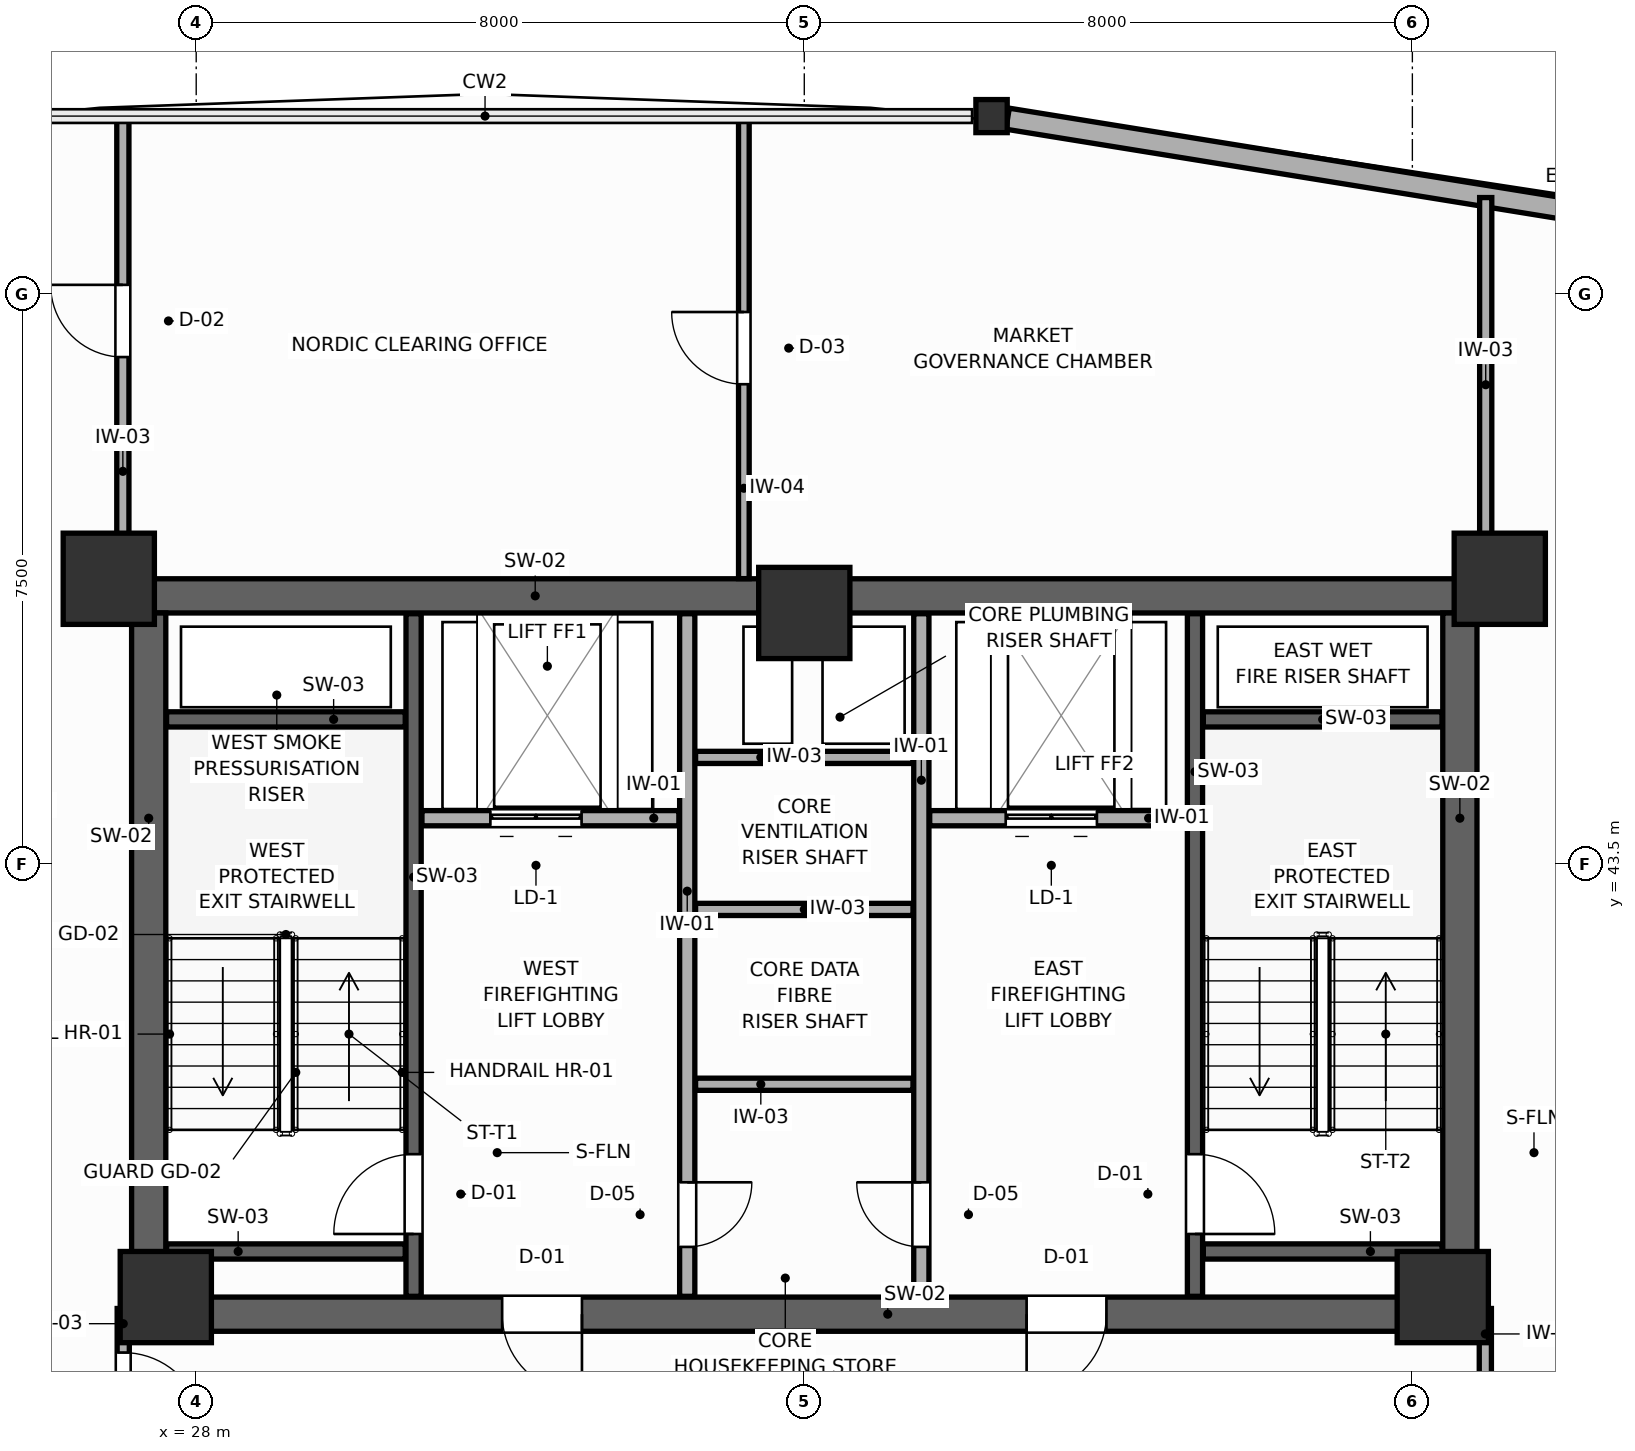
"""IFC4 building model, lengths in metres.
Left out: names, types, materials, properties, quantities, classifications, styles, units other than length and angle.
Written with IfcOpenShell. Run it as: python <this file> out.ifc"""

import sys

from ifc_helpers import new_model, si_unit, direction, frame, frame_2d, origin, origin_2d, place, context, subcontext, project, spatial, rectangle, i_section, extrude, source, transform, mapped, element, fill, save


model = new_model("IFC4")
c1 = context("Model", 3, precision=1e-05, world=origin(), true_north=direction((0.0, 1.0)))
c2 = subcontext(c1, "Body", "Model", "MODEL_VIEW")
j1 = project(units=[si_unit("LENGTHUNIT", "METRE"), si_unit("PLANEANGLEUNIT", "RADIAN")], contexts=[c1])
p1 = place(None, origin())
s1 = spatial("IfcSite", under=j1, at=p1, CompositionType="ELEMENT")
p2 = place(p1, origin())
s2 = spatial("IfcBuilding", under=s1, at=p2, CompositionType="ELEMENT")
p3 = place(p2, frame((0.0, 0.0, 143.4)))
s3 = spatial("IfcBuildingStorey", under=s2, at=p3, CompositionType="ELEMENT", Elevation=143.4)
p4 = place(p3, frame((27.15, 47.025, 0.0), z_axis=(0.0, 0.0, 1.0), x_axis=(1.0, 0.0, 0.0)))
e1 = element("IfcWall", 1, at=p4, inside=s3, PredefinedType="SHEAR", context=c2, shape_type="SweptSolid", body=[
    extrude(rectangle(XDim=17.7, YDim=0.45, at=frame_2d((8.85, 0.0))), origin(), (0.0, 0.0, 1.0), 3.6),
])
p5 = place(p3, frame((27.15, 37.575, 0.0), z_axis=(0.0, 0.0, 1.0), x_axis=(1.0, 0.0, 0.0)))
e2 = element("IfcWall", 2, at=p5, inside=s3, PredefinedType="SHEAR", context=c2, shape_type="SweptSolid", body=[
    extrude(rectangle(XDim=17.7, YDim=0.45, at=frame_2d((8.85, 0.0))), origin(), (0.0, 0.0, 1.0), 3.6),
])
p6 = place(p5, frame((4.875, 0.0, 0.0)))
e3 = element("IfcOpeningElement", 3, at=p6, cuts=e2, PredefinedType="OPENING", context=c2, shape_type="SweptSolid", body=[
    extrude(rectangle(XDim=1.05, YDim=2.1, at=frame_2d((0.525, 1.05))), frame((0.0, 0.235, 0.0), z_axis=(0.0, -1.0, 0.0), x_axis=(1.0, 0.0, 0.0)), (0.0, 0.0, 1.0), 0.47),
])
p7 = place(p5, frame((11.775, 0.0, 0.0)))
e4 = element("IfcOpeningElement", 4, at=p7, cuts=e2, PredefinedType="OPENING", context=c2, shape_type="SweptSolid", body=[
    extrude(rectangle(XDim=1.05, YDim=2.1, at=frame_2d((0.525, 1.05))), frame((0.0, 0.235, 0.0), z_axis=(0.0, -1.0, 0.0), x_axis=(1.0, 0.0, 0.0)), (0.0, 0.0, 1.0), 0.47),
])
for number, where, z_axis, x_axis in (
    (5, (27.375, 37.8, 0.0), (0.0, 0.0, 1.0), (0.0, 1.0, 0.0)),
    (6, (44.625, 37.8, 0.0), (0.0, 0.0, 1.0), (0.0, 1.0, 0.0)),
):
    element("IfcWall", number, at=place(p3, frame(where, z_axis=z_axis, x_axis=x_axis)), inside=s3, PredefinedType="SHEAR", context=c2, shape_type="SweptSolid", body=[
        extrude(rectangle(XDim=9.0, YDim=0.45, at=frame_2d((4.5, 0.0))), origin(), (0.0, 0.0, 1.0), 3.6),
    ])
m1 = source(origin(), c2, "Body", "SweptSolid", [
    extrude(rectangle(XDim=1.2, YDim=1.2, at=origin_2d()), origin(), (0.0, 0.0, 1.0), 3.6),
])
for number, where, z_axis, x_axis in (
    (7, (26.85, 47.25, 0.0), (0.0, 0.0, 1.0), (1.0, 0.0, 0.0)),
    (8, (45.15, 47.25, 0.0), (0.0, 0.0, 1.0), (1.0, 0.0, 0.0)),
    (9, (27.6, 37.8, 0.0), (0.0, 0.0, 1.0), (1.0, 0.0, 0.0)),
    (10, (44.4, 37.8, 0.0), (0.0, 0.0, 1.0), (1.0, 0.0, 0.0)),
    (11, (36.0, 46.8, 0.0), (0.0, 0.0, 1.0), (1.0, 0.0, 0.0)),
):
    element("IfcColumn", number, at=place(p3, frame(where, z_axis=z_axis, x_axis=x_axis)), inside=s3, PredefinedType="COLUMN", context=c2, shape_type="MappedRepresentation", body=[
        mapped(m1, transform((0.0, 0.0, 0.0), scale=1.0)),
    ])
m2 = source(origin(), c2, "Body", "SweptSolid", [
    extrude(i_section(OverallWidth=0.412, OverallDepth=0.435, WebThickness=0.033, FlangeThickness=0.053, FilletRadius=0.015, at=origin_2d()), origin(), (0.0, 0.0, 1.0), 3.6),
])
p8 = place(p3, frame((38.464, 53.337, 0.0), z_axis=(0.0, 0.0, 1.0), x_axis=(1.0, 0.0, 0.0)))
e12 = element("IfcColumn", 12, at=p8, inside=s3, PredefinedType="COLUMN", context=c2, shape_type="MappedRepresentation", body=[
    mapped(m2, transform((0.0, 0.0, 0.0), scale=1.0)),
])
p9 = place(p3, frame((53.646, 50.881, 0.0), z_axis=(0.0, 0.0, 1.0), x_axis=(-0.987165905884, 0.159698072185, 0.0)))
e13 = element("IfcWall", 13, at=p9, inside=s3, PredefinedType="SOLIDWALL", context=c2, shape_type="SweptSolid", body=[
    extrude(rectangle(XDim=15.165, YDim=0.28, at=frame_2d((7.583, 0.0))), origin(), (0.0, 0.0, 1.0), 1.87),
])
p10 = place(p3, frame((30.86, 37.81, 0.0), z_axis=(0.0, 0.0, 1.0), x_axis=(0.0, 1.0, 0.0)))
e14 = element("IfcWall", 14, at=p10, inside=s3, PredefinedType="SHEAR", context=c2, shape_type="SweptSolid", body=[
    extrude(rectangle(XDim=8.98, YDim=0.2, at=frame_2d((4.49, 0.0))), origin(), (0.0, 0.0, 1.0), 3.6),
])
p11 = place(p10, frame((0.82, 0.0, 0.0)))
e15 = element("IfcOpeningElement", 15, at=p11, cuts=e14, PredefinedType="OPENING", context=c2, shape_type="SweptSolid", body=[
    extrude(rectangle(XDim=1.05, YDim=2.1, at=frame_2d((0.525, 1.05))), frame((0.0, 0.11, 0.0), z_axis=(0.0, -1.0, 0.0), x_axis=(1.0, 0.0, 0.0)), (0.0, 0.0, 1.0), 0.22),
])
for number, where, z_axis, x_axis in (
    (16, (27.61, 45.4, 0.0), (0.0, 0.0, 1.0), (1.0, 0.0, 0.0)),
    (17, (27.61, 38.4, 0.0), (0.0, 0.0, 1.0), (1.0, 0.0, 0.0)),
):
    element("IfcWall", number, at=place(p3, frame(where, z_axis=z_axis, x_axis=x_axis)), inside=s3, PredefinedType="SHEAR", context=c2, shape_type="SweptSolid", body=[
        extrude(rectangle(XDim=3.14, YDim=0.2, at=frame_2d((1.57, 0.0))), origin(), (0.0, 0.0, 1.0), 3.6),
    ])
p12 = place(p3, frame((41.14, 37.81, 0.0), z_axis=(0.0, 0.0, 1.0), x_axis=(0.0, 1.0, 0.0)))
e18 = element("IfcWall", 18, at=p12, inside=s3, PredefinedType="SHEAR", context=c2, shape_type="SweptSolid", body=[
    extrude(rectangle(XDim=8.98, YDim=0.2, at=frame_2d((4.49, 0.0))), origin(), (0.0, 0.0, 1.0), 3.6),
])
p13 = place(p12, frame((0.82, 0.0, 0.0)))
e19 = element("IfcOpeningElement", 19, at=p13, cuts=e18, PredefinedType="OPENING", context=c2, shape_type="SweptSolid", body=[
    extrude(rectangle(XDim=1.05, YDim=2.1, at=frame_2d((0.525, 1.05))), frame((0.0, 0.11, 0.0), z_axis=(0.0, -1.0, 0.0), x_axis=(1.0, 0.0, 0.0)), (0.0, 0.0, 1.0), 0.22),
])
for number, where, z_axis, x_axis in (
    (20, (41.25, 45.4, 0.0), (0.0, 0.0, 1.0), (1.0, 0.0, 0.0)),
    (21, (41.25, 38.4, 0.0), (0.0, 0.0, 1.0), (1.0, 0.0, 0.0)),
):
    element("IfcWall", number, at=place(p3, frame(where, z_axis=z_axis, x_axis=x_axis)), inside=s3, PredefinedType="SHEAR", context=c2, shape_type="SweptSolid", body=[
        extrude(rectangle(XDim=3.14, YDim=0.2, at=frame_2d((1.57, 0.0))), origin(), (0.0, 0.0, 1.0), 3.6),
    ])
p14 = place(p3, frame((30.97, 44.1, 0.0), z_axis=(0.0, 0.0, 1.0), x_axis=(1.0, 0.0, 0.0)))
e22 = element("IfcWall", 22, at=p14, inside=s3, PredefinedType="PARTITIONING", context=c2, shape_type="SweptSolid", body=[
    extrude(rectangle(XDim=3.38, YDim=0.2, at=frame_2d((1.69, 0.0))), origin(), (0.0, 0.0, 1.0), 3.4),
])
p15 = place(p14, frame((0.9, 0.0, 0.0)))
e23 = element("IfcOpeningElement", 23, at=p15, cuts=e22, PredefinedType="OPENING", context=c2, shape_type="SweptSolid", body=[
    extrude(rectangle(XDim=1.2, YDim=2.1, at=frame_2d((0.6, 1.05))), frame((0.0, 0.11, 0.0), z_axis=(0.0, -1.0, 0.0), x_axis=(1.0, 0.0, 0.0)), (0.0, 0.0, 1.0), 0.22),
])
p16 = place(p3, frame((37.65, 44.1, 0.0), z_axis=(0.0, 0.0, 1.0), x_axis=(1.0, 0.0, 0.0)))
e24 = element("IfcWall", 24, at=p16, inside=s3, PredefinedType="PARTITIONING", context=c2, shape_type="SweptSolid", body=[
    extrude(rectangle(XDim=3.38, YDim=0.2, at=frame_2d((1.69, 0.0))), origin(), (0.0, 0.0, 1.0), 3.4),
])
p17 = place(p16, frame((1.0, 0.0, 0.0)))
e25 = element("IfcOpeningElement", 25, at=p17, cuts=e24, PredefinedType="OPENING", context=c2, shape_type="SweptSolid", body=[
    extrude(rectangle(XDim=1.2, YDim=2.1, at=frame_2d((0.6, 1.05))), frame((0.0, 0.11, 0.0), z_axis=(0.0, -1.0, 0.0), x_axis=(1.0, 0.0, 0.0)), (0.0, 0.0, 1.0), 0.22),
])
p18 = place(p3, frame((34.46, 37.81, 0.0), z_axis=(0.0, 0.0, 1.0), x_axis=(0.0, 1.0, 0.0)))
e26 = element("IfcWall", 26, at=p18, inside=s3, PredefinedType="PARTITIONING", context=c2, shape_type="SweptSolid", body=[
    extrude(rectangle(XDim=8.98, YDim=0.2, at=frame_2d((4.49, 0.0))), origin(), (0.0, 0.0, 1.0), 3.4),
])
p19 = place(p18, frame((0.65, 0.0, 0.0)))
e27 = element("IfcOpeningElement", 27, at=p19, cuts=e26, PredefinedType="OPENING", context=c2, shape_type="SweptSolid", body=[
    extrude(rectangle(XDim=0.85, YDim=2.05, at=frame_2d((0.425, 1.025))), frame((0.0, 0.11, 0.0), z_axis=(0.0, -1.0, 0.0), x_axis=(1.0, 0.0, 0.0)), (0.0, 0.0, 1.0), 0.22),
])
p20 = place(p3, frame((37.54, 37.81, 0.0), z_axis=(0.0, 0.0, 1.0), x_axis=(0.0, 1.0, 0.0)))
e28 = element("IfcWall", 28, at=p20, inside=s3, PredefinedType="PARTITIONING", context=c2, shape_type="SweptSolid", body=[
    extrude(rectangle(XDim=8.98, YDim=0.2, at=frame_2d((4.49, 0.0))), origin(), (0.0, 0.0, 1.0), 3.4),
])
p21 = place(p20, frame((0.65, 0.0, 0.0)))
e29 = element("IfcOpeningElement", 29, at=p21, cuts=e28, PredefinedType="OPENING", context=c2, shape_type="SweptSolid", body=[
    extrude(rectangle(XDim=0.85, YDim=2.05, at=frame_2d((0.425, 1.025))), frame((0.0, 0.11, 0.0), z_axis=(0.0, -1.0, 0.0), x_axis=(1.0, 0.0, 0.0)), (0.0, 0.0, 1.0), 0.22),
])
for number, where, z_axis, x_axis in (
    (30, (34.57, 40.6, 0.0), (0.0, 0.0, 1.0), (1.0, 0.0, 0.0)),
    (31, (34.57, 42.9, 0.0), (0.0, 0.0, 1.0), (1.0, 0.0, 0.0)),
    (32, (34.57, 44.9, 0.0), (0.0, 0.0, 1.0), (1.0, 0.0, 0.0)),
):
    element("IfcWall", number, at=place(p3, frame(where, z_axis=z_axis, x_axis=x_axis)), inside=s3, PredefinedType="PARTITIONING", context=c2, shape_type="SweptSolid", body=[
        extrude(rectangle(XDim=2.86, YDim=0.16, at=frame_2d((1.43, 0.0))), origin(), (0.0, 0.0, 1.0), 3.4),
    ])
p22 = place(p3, frame((27.04, 35.54, 0.0), z_axis=(0.0, 0.0, 1.0), x_axis=(0.0, 1.0, 0.0)))
e33 = element("IfcWall", 33, at=p22, inside=s3, PredefinedType="PARTITIONING", context=c2, shape_type="SweptSolid", body=[
    extrude(rectangle(XDim=2.11, YDim=0.16, at=frame_2d((1.055, 0.0))), origin(), (0.0, 0.0, 1.0), 3.4),
])
p23 = place(p22, frame((0.48, 0.0, 0.0)))
e34 = element("IfcOpeningElement", 34, at=p23, cuts=e33, PredefinedType="OPENING", context=c2, shape_type="SweptSolid", body=[
    extrude(rectangle(XDim=1.05, YDim=2.1, at=frame_2d((0.525, 1.05))), frame((0.0, 0.09, 0.0), z_axis=(0.0, -1.0, 0.0), x_axis=(1.0, 0.0, 0.0)), (0.0, 0.0, 1.0), 0.18),
])
p24 = place(p3, frame((44.96, 35.0, 0.0), z_axis=(0.0, 0.0, 1.0), x_axis=(0.0, 1.0, 0.0)))
e35 = element("IfcWall", 35, at=p24, inside=s3, PredefinedType="PARTITIONING", context=c2, shape_type="SweptSolid", body=[
    extrude(rectangle(XDim=2.65, YDim=0.16, at=frame_2d((1.325, 0.0))), origin(), (0.0, 0.0, 1.0), 3.4),
])
p25 = place(p24, frame((0.75, 0.0, 0.0)))
e36 = element("IfcOpeningElement", 36, at=p25, cuts=e35, PredefinedType="OPENING", context=c2, shape_type="SweptSolid", body=[
    extrude(rectangle(XDim=1.05, YDim=2.1, at=frame_2d((0.525, 1.05))), frame((0.0, 0.09, 0.0), z_axis=(0.0, -1.0, 0.0), x_axis=(1.0, 0.0, 0.0)), (0.0, 0.0, 1.0), 0.18),
])
p26 = place(p3, frame((27.035, 47.34, 0.0), z_axis=(0.0, 0.0, 1.0), x_axis=(0.0, 1.0, 0.0)))
e37 = element("IfcWall", 37, at=p26, inside=s3, PredefinedType="PARTITIONING", context=c2, shape_type="SweptSolid", body=[
    extrude(rectangle(XDim=5.977, YDim=0.16, at=frame_2d((2.988, 0.0))), origin(), (0.0, 0.0, 1.0), 2.16),
])
p27 = place(p26, frame((2.827, 0.0, 0.0)))
e38 = element("IfcOpeningElement", 38, at=p27, cuts=e37, PredefinedType="OPENING", context=c2, shape_type="SweptSolid", body=[
    extrude(rectangle(XDim=0.95, YDim=2.05, at=frame_2d((0.475, 1.025))), frame((0.0, 0.09, 0.0), z_axis=(0.0, -1.0, 0.0), x_axis=(1.0, 0.0, 0.0)), (0.0, 0.0, 1.0), 0.18),
])
p28 = place(p3, frame((44.965, 47.34, 0.0), z_axis=(0.0, 0.0, 1.0), x_axis=(0.0, 1.0, 0.0)))
e39 = element("IfcWall", 39, at=p28, inside=s3, PredefinedType="PARTITIONING", context=c2, shape_type="SweptSolid", body=[
    extrude(rectangle(XDim=4.925, YDim=0.16, at=frame_2d((2.463, 0.0))), origin(), (0.0, 0.0, 1.0), 3.4),
])
p29 = place(p3, frame((35.205, 47.252, 0.0), z_axis=(0.0, 0.0, 1.0), x_axis=(0.0, 1.0, 0.0)))
e40 = element("IfcWall", 40, at=p29, inside=s3, PredefinedType="PARTITIONING", context=c2, shape_type="SweptSolid", body=[
    extrude(rectangle(XDim=6.065, YDim=0.14, at=frame_2d((3.032, 0.0))), origin(), (0.0, 0.0, 1.0), 3.4),
])
p30 = place(p29, frame((2.558, 0.0, 0.0)))
e41 = element("IfcOpeningElement", 41, at=p30, cuts=e40, PredefinedType="OPENING", context=c2, shape_type="SweptSolid", body=[
    extrude(rectangle(XDim=0.95, YDim=2.05, at=frame_2d((0.475, 1.025))), frame((0.0, 0.08, 0.0), z_axis=(0.0, -1.0, 0.0), x_axis=(1.0, 0.0, 0.0)), (0.0, 0.0, 1.0), 0.16),
])
p31 = place(p11, origin())
e42 = element("IfcDoor", 42, at=p31, inside=s3, OperationType="SINGLE_SWING_LEFT", PredefinedType="DOOR", context=c2, shape_type="SweptSolid", body=[
    extrude(rectangle(XDim=1.05, YDim=2.1, at=frame_2d((0.525, 1.05))), frame((0.0, 0.025, 0.0), z_axis=(0.0, -1.0, 0.0), x_axis=(1.0, 0.0, 0.0)), (0.0, 0.0, 1.0), 0.05),
])
fill(e15, e42)
p32 = place(p13, frame((1.05, 0.0, 0.0), z_axis=(0.0, 0.0, 1.0), x_axis=(-1.0, 0.0, 0.0)))
e43 = element("IfcDoor", 43, at=p32, inside=s3, OperationType="SINGLE_SWING_RIGHT", PredefinedType="DOOR", context=c2, shape_type="SweptSolid", body=[
    extrude(rectangle(XDim=1.05, YDim=2.1, at=frame_2d((0.525, 1.05))), frame((0.0, 0.025, 0.0), z_axis=(0.0, -1.0, 0.0), x_axis=(1.0, 0.0, 0.0)), (0.0, 0.0, 1.0), 0.05),
])
fill(e19, e43)
p33 = place(p15, origin())
e44 = element("IfcDoor", 44, at=p33, inside=s3, OperationType="DOUBLE_DOOR_SLIDING", PredefinedType="DOOR", context=c2, shape_type="SweptSolid", body=[
    extrude(rectangle(XDim=1.2, YDim=2.1, at=frame_2d((0.6, 1.05))), frame((0.0, 0.025, 0.0), z_axis=(0.0, -1.0, 0.0), x_axis=(1.0, 0.0, 0.0)), (0.0, 0.0, 1.0), 0.05),
])
fill(e23, e44)
p34 = place(p17, origin())
e45 = element("IfcDoor", 45, at=p34, inside=s3, OperationType="DOUBLE_DOOR_SLIDING", PredefinedType="DOOR", context=c2, shape_type="SweptSolid", body=[
    extrude(rectangle(XDim=1.2, YDim=2.1, at=frame_2d((0.6, 1.05))), frame((0.0, 0.025, 0.0), z_axis=(0.0, -1.0, 0.0), x_axis=(1.0, 0.0, 0.0)), (0.0, 0.0, 1.0), 0.05),
])
fill(e25, e45)
p35 = place(p19, frame((0.85, 0.0, 0.0), z_axis=(0.0, 0.0, 1.0), x_axis=(-1.0, 0.0, 0.0)))
e46 = element("IfcDoor", 46, at=p35, inside=s3, OperationType="SINGLE_SWING_LEFT", PredefinedType="DOOR", context=c2, shape_type="SweptSolid", body=[
    extrude(rectangle(XDim=0.85, YDim=2.05, at=frame_2d((0.425, 1.025))), frame((0.0, 0.025, 0.0), z_axis=(0.0, -1.0, 0.0), x_axis=(1.0, 0.0, 0.0)), (0.0, 0.0, 1.0), 0.05),
])
fill(e27, e46)
p36 = place(p21, origin())
e47 = element("IfcDoor", 47, at=p36, inside=s3, OperationType="SINGLE_SWING_RIGHT", PredefinedType="DOOR", context=c2, shape_type="SweptSolid", body=[
    extrude(rectangle(XDim=0.85, YDim=2.05, at=frame_2d((0.425, 1.025))), frame((0.0, 0.025, 0.0), z_axis=(0.0, -1.0, 0.0), x_axis=(1.0, 0.0, 0.0)), (0.0, 0.0, 1.0), 0.05),
])
fill(e29, e47)
p37 = place(p23, frame((1.05, 0.0, 0.0), z_axis=(0.0, 0.0, 1.0), x_axis=(-1.0, 0.0, 0.0)))
e48 = element("IfcDoor", 48, at=p37, inside=s3, OperationType="SINGLE_SWING_RIGHT", PredefinedType="DOOR", context=c2, shape_type="SweptSolid", body=[
    extrude(rectangle(XDim=1.05, YDim=2.1, at=frame_2d((0.525, 1.05))), frame((0.0, 0.025, 0.0), z_axis=(0.0, -1.0, 0.0), x_axis=(1.0, 0.0, 0.0)), (0.0, 0.0, 1.0), 0.05),
])
fill(e34, e48)
p38 = place(p27, origin())
e49 = element("IfcDoor", 49, at=p38, inside=s3, OperationType="SINGLE_SWING_RIGHT", PredefinedType="DOOR", context=c2, shape_type="SweptSolid", body=[
    extrude(rectangle(XDim=0.95, YDim=2.05, at=frame_2d((0.475, 1.025))), frame((0.0, 0.025, 0.0), z_axis=(0.0, -1.0, 0.0), x_axis=(1.0, 0.0, 0.0)), (0.0, 0.0, 1.0), 0.05),
])
fill(e38, e49)
p39 = place(p30, origin())
e50 = element("IfcDoor", 50, at=p39, inside=s3, OperationType="SINGLE_SWING_RIGHT", PredefinedType="DOOR", context=c2, shape_type="SweptSolid", body=[
    extrude(rectangle(XDim=0.95, YDim=2.05, at=frame_2d((0.475, 1.025))), frame((0.0, 0.025, 0.0), z_axis=(0.0, -1.0, 0.0), x_axis=(1.0, 0.0, 0.0)), (0.0, 0.0, 1.0), 0.05),
])
fill(e41, e50)
p40 = place(p6, frame((1.05, 0.0, 0.0), z_axis=(0.0, 0.0, 1.0), x_axis=(-1.0, 0.0, 0.0)))
e51 = element("IfcDoor", 51, at=p40, inside=s3, OperationType="SINGLE_SWING_LEFT", PredefinedType="DOOR", context=c2, shape_type="SweptSolid", body=[
    extrude(rectangle(XDim=1.05, YDim=2.1, at=frame_2d((0.525, 1.05))), frame((0.0, 0.025, 0.0), z_axis=(0.0, -1.0, 0.0), x_axis=(1.0, 0.0, 0.0)), (0.0, 0.0, 1.0), 0.05),
])
fill(e3, e51)
p41 = place(p7, frame((1.05, 0.0, 0.0), z_axis=(0.0, 0.0, 1.0), x_axis=(-1.0, 0.0, 0.0)))
e52 = element("IfcDoor", 52, at=p41, inside=s3, OperationType="SINGLE_SWING_RIGHT", PredefinedType="DOOR", context=c2, shape_type="SweptSolid", body=[
    extrude(rectangle(XDim=1.05, YDim=2.1, at=frame_2d((0.525, 1.05))), frame((0.0, 0.025, 0.0), z_axis=(0.0, -1.0, 0.0), x_axis=(1.0, 0.0, 0.0)), (0.0, 0.0, 1.0), 0.05),
])
fill(e4, e52)
save(model, sys.argv[1])
